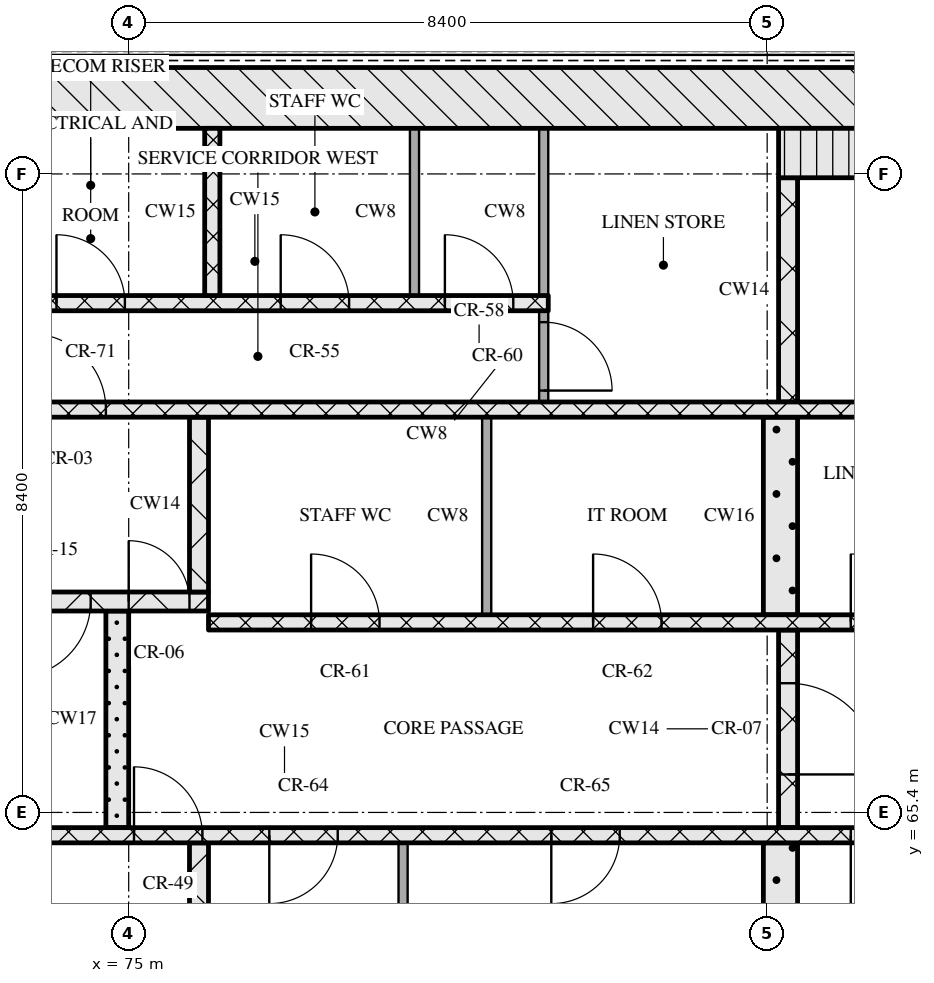
"""IFC4 building model, lengths in metres.
Left out: names, types, materials, properties, quantities, classifications, styles, units other than length and angle.
Written with IfcOpenShell. Run it as: python <this file> out.ifc"""

import sys

from ifc_helpers import new_model, si_unit, direction, frame, frame_2d, origin, place, context, subcontext, project, spatial, rectangle, extrude, element, fill, save


model = new_model("IFC4")
c1 = context("Model", 3, precision=1e-05, world=origin(), true_north=direction((0.0, 1.0)))
c2 = subcontext(c1, "Body", "Model", "MODEL_VIEW")
j1 = project(units=[si_unit("LENGTHUNIT", "METRE"), si_unit("PLANEANGLEUNIT", "RADIAN")], contexts=[c1])
p1 = place(None, origin())
s1 = spatial("IfcSite", under=j1, at=p1, CompositionType="ELEMENT")
p2 = place(p1, origin())
s2 = spatial("IfcBuilding", under=s1, at=p2, CompositionType="ELEMENT")
p3 = place(p2, frame((0.0, 0.0, 176.25)))
s3 = spatial("IfcBuildingStorey", under=s2, at=p3, CompositionType="ELEMENT", Elevation=176.25)
p4 = place(p3, frame((67.0, 74.8, 0.0), z_axis=(0.0, 0.0, 1.0), x_axis=(1.0, 0.0, 0.0)))
e1 = element("IfcWall", 1, at=p4, inside=s3, PredefinedType="SOLIDWALL", context=c2, shape_type="SweptSolid", body=[
    extrude(rectangle(XDim=41.2, YDim=0.8, at=frame_2d((20.6, 0.0))), origin(), (0.0, 0.0, 1.0), 3.32),
])
p5 = place(p3, frame((75.925, 62.4, 0.0), z_axis=(0.0, 0.0, 1.0), x_axis=(0.0, 1.0, 0.0)))
e2 = element("IfcWall", 2, at=p5, inside=s3, PredefinedType="SOLIDWALL", context=c2, shape_type="SweptSolid", body=[
    extrude(rectangle(XDim=2.6, YDim=0.25, at=frame_2d((1.3, 0.0))), origin(), (0.0, 0.0, 1.0), 3.32),
])
p6 = place(p3, frame((78.61, 62.4, 0.0), z_axis=(0.0, 0.0, 1.0), x_axis=(0.0, 1.0, 0.0)))
e3 = element("IfcWall", 3, at=p6, inside=s3, PredefinedType="PARTITIONING", context=c2, shape_type="SweptSolid", body=[
    extrude(rectangle(XDim=2.6, YDim=0.12, at=frame_2d((1.3, 0.0))), origin(), (0.0, 0.0, 1.0), 3.32),
])
p7 = place(p3, frame((83.575, 62.4, 0.0), z_axis=(0.0, 0.0, 1.0), x_axis=(0.0, 1.0, 0.0)))
e4 = element("IfcWall", 4, at=p7, inside=s3, PredefinedType="SOLIDWALL", context=c2, shape_type="SweptSolid", body=[
    extrude(rectangle(XDim=2.6, YDim=0.45, at=frame_2d((1.3, 0.0))), origin(), (0.0, 0.0, 1.0), 3.32),
])
p8 = place(p3, frame((67.8, 65.1, 0.0), z_axis=(0.0, 0.0, 1.0), x_axis=(1.0, 0.0, 0.0)))
e5 = element("IfcWall", 5, at=p8, inside=s3, PredefinedType="SOLIDWALL", context=c2, shape_type="SweptSolid", body=[
    extrude(rectangle(XDim=18.5, YDim=0.2, at=frame_2d((9.25, 0.0))), origin(), (0.0, 0.0, 1.0), 3.32),
])
p9 = place(p8, frame((7.27, 0.0, 0.0)))
e6 = element("IfcOpeningElement", 6, at=p9, cuts=e5, PredefinedType="OPENING", context=c2, shape_type="SweptSolid", body=[
    extrude(rectangle(XDim=0.9, YDim=2.1, at=frame_2d((0.45, 1.05))), frame((0.0, 0.11, 0.0), z_axis=(0.0, -1.0, 0.0), x_axis=(1.0, 0.0, 0.0)), (0.0, 0.0, 1.0), 0.22),
])
p10 = place(p8, frame((9.05, 0.0, 0.0)))
e7 = element("IfcOpeningElement", 7, at=p10, cuts=e5, PredefinedType="OPENING", context=c2, shape_type="SweptSolid", body=[
    extrude(rectangle(XDim=0.9, YDim=2.1, at=frame_2d((0.45, 1.05))), frame((0.0, 0.11, 0.0), z_axis=(0.0, -1.0, 0.0), x_axis=(1.0, 0.0, 0.0)), (0.0, 0.0, 1.0), 0.22),
])
p11 = place(p8, frame((12.76, 0.0, 0.0)))
e8 = element("IfcOpeningElement", 8, at=p11, cuts=e5, PredefinedType="OPENING", context=c2, shape_type="SweptSolid", body=[
    extrude(rectangle(XDim=0.9, YDim=2.1, at=frame_2d((0.45, 1.05))), frame((0.0, 0.11, 0.0), z_axis=(0.0, -1.0, 0.0), x_axis=(1.0, 0.0, 0.0)), (0.0, 0.0, 1.0), 0.22),
])
p12 = place(p8, frame((16.7, 0.0, 0.0)))
e9 = element("IfcOpeningElement", 9, at=p12, cuts=e5, PredefinedType="OPENING", context=c2, shape_type="SweptSolid", body=[
    extrude(rectangle(XDim=0.9, YDim=2.1, at=frame_2d((0.45, 1.05))), frame((0.0, 0.11, 0.0), z_axis=(0.0, -1.0, 0.0), x_axis=(1.0, 0.0, 0.0)), (0.0, 0.0, 1.0), 0.22),
])
p13 = place(p3, frame((74.85, 65.2, 0.0), z_axis=(0.0, 0.0, 1.0), x_axis=(0.0, 1.0, 0.0)))
e10 = element("IfcWall", 10, at=p13, inside=s3, PredefinedType="SOLIDWALL", context=c2, shape_type="SweptSolid", body=[
    extrude(rectangle(XDim=2.85, YDim=0.3, at=frame_2d((1.425, 0.0))), origin(), (0.0, 0.0, 1.0), 3.32),
])
p14 = place(p3, frame((83.675, 65.2, 0.0), z_axis=(0.0, 0.0, 1.0), x_axis=(0.0, 1.0, 0.0)))
e11 = element("IfcWall", 11, at=p14, inside=s3, PredefinedType="SOLIDWALL", context=c2, shape_type="SweptSolid", body=[
    extrude(rectangle(XDim=2.6, YDim=0.25, at=frame_2d((1.3, 0.0))), origin(), (0.0, 0.0, 1.0), 3.32),
])
p15 = place(p14, frame((0.7, 0.0, 0.0)))
e12 = element("IfcOpeningElement", 12, at=p15, cuts=e11, PredefinedType="OPENING", context=c2, shape_type="SweptSolid", body=[
    extrude(rectangle(XDim=1.2, YDim=2.1, at=frame_2d((0.6, 1.05))), frame((0.0, 0.135, 0.0), z_axis=(0.0, -1.0, 0.0), x_axis=(1.0, 0.0, 0.0)), (0.0, 0.0, 1.0), 0.27),
])
p16 = place(p3, frame((76.05, 67.9, 0.0), z_axis=(0.0, 0.0, 1.0), x_axis=(1.0, 0.0, 0.0)))
e13 = element("IfcWall", 13, at=p16, inside=s3, PredefinedType="SOLIDWALL", context=c2, shape_type="SweptSolid", body=[
    extrude(rectangle(XDim=23.1, YDim=0.2, at=frame_2d((11.55, 0.0))), origin(), (0.0, 0.0, 1.0), 3.32),
])
p17 = place(p16, frame((1.35, 0.0, 0.0)))
e14 = element("IfcOpeningElement", 14, at=p17, cuts=e13, PredefinedType="OPENING", context=c2, shape_type="SweptSolid", body=[
    extrude(rectangle(XDim=0.9, YDim=2.1, at=frame_2d((0.45, 1.05))), frame((0.0, 0.11, 0.0), z_axis=(0.0, -1.0, 0.0), x_axis=(1.0, 0.0, 0.0)), (0.0, 0.0, 1.0), 0.22),
])
p18 = place(p16, frame((5.06, 0.0, 0.0)))
e15 = element("IfcOpeningElement", 15, at=p18, cuts=e13, PredefinedType="OPENING", context=c2, shape_type="SweptSolid", body=[
    extrude(rectangle(XDim=0.9, YDim=2.1, at=frame_2d((0.45, 1.05))), frame((0.0, 0.11, 0.0), z_axis=(0.0, -1.0, 0.0), x_axis=(1.0, 0.0, 0.0)), (0.0, 0.0, 1.0), 0.22),
])
p19 = place(p16, frame((8.45, 0.0, 0.0)))
e16 = element("IfcOpeningElement", 16, at=p19, cuts=e13, PredefinedType="OPENING", context=c2, shape_type="SweptSolid", body=[
    extrude(rectangle(XDim=0.9, YDim=2.1, at=frame_2d((0.45, 1.05))), frame((0.0, 0.11, 0.0), z_axis=(0.0, -1.0, 0.0), x_axis=(1.0, 0.0, 0.0)), (0.0, 0.0, 1.0), 0.22),
])
p20 = place(p16, frame((10.91, 0.0, 0.0)))
e17 = element("IfcOpeningElement", 17, at=p20, cuts=e13, PredefinedType="OPENING", context=c2, shape_type="SweptSolid", body=[
    extrude(rectangle(XDim=0.9, YDim=2.1, at=frame_2d((0.45, 1.05))), frame((0.0, 0.11, 0.0), z_axis=(0.0, -1.0, 0.0), x_axis=(1.0, 0.0, 0.0)), (0.0, 0.0, 1.0), 0.22),
])
p21 = place(p16, frame((13.55, 0.0, 0.0)))
e18 = element("IfcOpeningElement", 18, at=p21, cuts=e13, PredefinedType="OPENING", context=c2, shape_type="SweptSolid", body=[
    extrude(rectangle(XDim=1.0, YDim=2.1, at=frame_2d((0.5, 1.05))), frame((0.0, 0.11, 0.0), z_axis=(0.0, -1.0, 0.0), x_axis=(1.0, 0.0, 0.0)), (0.0, 0.0, 1.0), 0.22),
])
p22 = place(p16, frame((16.2, 0.0, 0.0)))
e19 = element("IfcOpeningElement", 19, at=p22, cuts=e13, PredefinedType="OPENING", context=c2, shape_type="SweptSolid", body=[
    extrude(rectangle(XDim=1.1, YDim=2.1, at=frame_2d((0.55, 1.05))), frame((0.0, 0.11, 0.0), z_axis=(0.0, -1.0, 0.0), x_axis=(1.0, 0.0, 0.0)), (0.0, 0.0, 1.0), 0.22),
])
p23 = place(p16, frame((18.7, 0.0, 0.0)))
e20 = element("IfcOpeningElement", 20, at=p23, cuts=e13, PredefinedType="OPENING", context=c2, shape_type="SweptSolid", body=[
    extrude(rectangle(XDim=1.1, YDim=2.1, at=frame_2d((0.55, 1.05))), frame((0.0, 0.11, 0.0), z_axis=(0.0, -1.0, 0.0), x_axis=(1.0, 0.0, 0.0)), (0.0, 0.0, 1.0), 0.22),
])
p24 = place(p16, frame((21.2, 0.0, 0.0)))
e21 = element("IfcOpeningElement", 21, at=p24, cuts=e13, PredefinedType="OPENING", context=c2, shape_type="SweptSolid", body=[
    extrude(rectangle(XDim=1.1, YDim=2.1, at=frame_2d((0.55, 1.05))), frame((0.0, 0.11, 0.0), z_axis=(0.0, -1.0, 0.0), x_axis=(1.0, 0.0, 0.0)), (0.0, 0.0, 1.0), 0.22),
])
p25 = place(p3, frame((79.71, 68.0, 0.0), z_axis=(0.0, 0.0, 1.0), x_axis=(0.0, 1.0, 0.0)))
e22 = element("IfcWall", 22, at=p25, inside=s3, PredefinedType="PARTITIONING", context=c2, shape_type="SweptSolid", body=[
    extrude(rectangle(XDim=2.6, YDim=0.12, at=frame_2d((1.3, 0.0))), origin(), (0.0, 0.0, 1.0), 3.32),
])
p26 = place(p3, frame((83.575, 68.0, 0.0), z_axis=(0.0, 0.0, 1.0), x_axis=(0.0, 1.0, 0.0)))
e23 = element("IfcWall", 23, at=p26, inside=s3, PredefinedType="SOLIDWALL", context=c2, shape_type="SweptSolid", body=[
    extrude(rectangle(XDim=2.6, YDim=0.45, at=frame_2d((1.3, 0.0))), origin(), (0.0, 0.0, 1.0), 3.32),
])
p27 = place(p3, frame((67.8, 68.175, 0.0), z_axis=(0.0, 0.0, 1.0), x_axis=(1.0, 0.0, 0.0)))
e24 = element("IfcWall", 24, at=p27, inside=s3, PredefinedType="SOLIDWALL", context=c2, shape_type="SweptSolid", body=[
    extrude(rectangle(XDim=8.25, YDim=0.25, at=frame_2d((4.125, 0.0))), origin(), (0.0, 0.0, 1.0), 3.32),
])
p28 = place(p27, frame((5.7, 0.0, 0.0)))
e25 = element("IfcOpeningElement", 25, at=p28, cuts=e24, PredefinedType="OPENING", context=c2, shape_type="SweptSolid", body=[
    extrude(rectangle(XDim=1.0, YDim=2.1, at=frame_2d((0.5, 1.05))), frame((0.0, 0.135, 0.0), z_axis=(0.0, -1.0, 0.0), x_axis=(1.0, 0.0, 0.0)), (0.0, 0.0, 1.0), 0.27),
])
p29 = place(p27, frame((7.2, 0.0, 0.0)))
e26 = element("IfcOpeningElement", 26, at=p29, cuts=e24, PredefinedType="OPENING", context=c2, shape_type="SweptSolid", body=[
    extrude(rectangle(XDim=0.8, YDim=2.1, at=frame_2d((0.4, 1.05))), frame((0.0, 0.135, 0.0), z_axis=(0.0, -1.0, 0.0), x_axis=(1.0, 0.0, 0.0)), (0.0, 0.0, 1.0), 0.27),
])
p30 = place(p3, frame((75.925, 68.3, 0.0), z_axis=(0.0, 0.0, 1.0), x_axis=(0.0, 1.0, 0.0)))
e27 = element("IfcWall", 27, at=p30, inside=s3, PredefinedType="SOLIDWALL", context=c2, shape_type="SweptSolid", body=[
    extrude(rectangle(XDim=2.3, YDim=0.25, at=frame_2d((1.15, 0.0))), origin(), (0.0, 0.0, 1.0), 3.32),
])
p31 = place(p3, frame((67.8, 70.7, 0.0), z_axis=(0.0, 0.0, 1.0), x_axis=(1.0, 0.0, 0.0)))
e28 = element("IfcWall", 28, at=p31, inside=s3, PredefinedType="SOLIDWALL", context=c2, shape_type="SweptSolid", body=[
    extrude(rectangle(XDim=39.6, YDim=0.2, at=frame_2d((19.8, 0.0))), origin(), (0.0, 0.0, 1.0), 3.32),
])
p32 = place(p31, frame((0.65, 0.0, 0.0)))
e29 = element("IfcOpeningElement", 29, at=p32, cuts=e28, PredefinedType="OPENING", context=c2, shape_type="SweptSolid", body=[
    extrude(rectangle(XDim=1.1, YDim=2.1, at=frame_2d((0.55, 1.05))), frame((0.0, 0.11, 0.0), z_axis=(0.0, -1.0, 0.0), x_axis=(1.0, 0.0, 0.0)), (0.0, 0.0, 1.0), 0.22),
])
p33 = place(p31, frame((3.25, 0.0, 0.0)))
e30 = element("IfcOpeningElement", 30, at=p33, cuts=e28, PredefinedType="OPENING", context=c2, shape_type="SweptSolid", body=[
    extrude(rectangle(XDim=1.1, YDim=2.1, at=frame_2d((0.55, 1.05))), frame((0.0, 0.11, 0.0), z_axis=(0.0, -1.0, 0.0), x_axis=(1.0, 0.0, 0.0)), (0.0, 0.0, 1.0), 0.22),
])
p34 = place(p31, frame((5.9, 0.0, 0.0)))
e31 = element("IfcOpeningElement", 31, at=p34, cuts=e28, PredefinedType="OPENING", context=c2, shape_type="SweptSolid", body=[
    extrude(rectangle(XDim=1.0, YDim=2.1, at=frame_2d((0.5, 1.05))), frame((0.0, 0.11, 0.0), z_axis=(0.0, -1.0, 0.0), x_axis=(1.0, 0.0, 0.0)), (0.0, 0.0, 1.0), 0.22),
])
p35 = place(p31, frame((21.7, 0.0, 0.0)))
e32 = element("IfcOpeningElement", 32, at=p35, cuts=e28, PredefinedType="OPENING", context=c2, shape_type="SweptSolid", body=[
    extrude(rectangle(XDim=1.0, YDim=2.1, at=frame_2d((0.5, 1.05))), frame((0.0, 0.11, 0.0), z_axis=(0.0, -1.0, 0.0), x_axis=(1.0, 0.0, 0.0)), (0.0, 0.0, 1.0), 0.22),
])
p36 = place(p31, frame((32.7, 0.0, 0.0)))
e33 = element("IfcOpeningElement", 33, at=p36, cuts=e28, PredefinedType="OPENING", context=c2, shape_type="SweptSolid", body=[
    extrude(rectangle(XDim=1.0, YDim=2.1, at=frame_2d((0.5, 1.05))), frame((0.0, 0.11, 0.0), z_axis=(0.0, -1.0, 0.0), x_axis=(1.0, 0.0, 0.0)), (0.0, 0.0, 1.0), 0.22),
])
p37 = place(p31, frame((35.25, 0.0, 0.0)))
e34 = element("IfcOpeningElement", 34, at=p37, cuts=e28, PredefinedType="OPENING", context=c2, shape_type="SweptSolid", body=[
    extrude(rectangle(XDim=1.1, YDim=2.1, at=frame_2d((0.55, 1.05))), frame((0.0, 0.11, 0.0), z_axis=(0.0, -1.0, 0.0), x_axis=(1.0, 0.0, 0.0)), (0.0, 0.0, 1.0), 0.22),
])
p38 = place(p31, frame((37.85, 0.0, 0.0)))
e35 = element("IfcOpeningElement", 35, at=p38, cuts=e28, PredefinedType="OPENING", context=c2, shape_type="SweptSolid", body=[
    extrude(rectangle(XDim=1.1, YDim=2.1, at=frame_2d((0.55, 1.05))), frame((0.0, 0.11, 0.0), z_axis=(0.0, -1.0, 0.0), x_axis=(1.0, 0.0, 0.0)), (0.0, 0.0, 1.0), 0.22),
])
p39 = place(p3, frame((80.46, 70.8, 0.0), z_axis=(0.0, 0.0, 1.0), x_axis=(0.0, 1.0, 0.0)))
e36 = element("IfcWall", 36, at=p39, inside=s3, PredefinedType="PARTITIONING", context=c2, shape_type="SweptSolid", body=[
    extrude(rectangle(XDim=1.2, YDim=0.12, at=frame_2d((0.6, 0.0))), origin(), (0.0, 0.0, 1.0), 3.32),
])
p40 = place(p39, frame((0.15, 0.0, 0.0)))
e37 = element("IfcOpeningElement", 37, at=p40, cuts=e36, PredefinedType="OPENING", context=c2, shape_type="SweptSolid", body=[
    extrude(rectangle(XDim=0.9, YDim=2.1, at=frame_2d((0.45, 1.05))), frame((0.0, 0.07, 0.0), z_axis=(0.0, -1.0, 0.0), x_axis=(1.0, 0.0, 0.0)), (0.0, 0.0, 1.0), 0.14),
])
p41 = place(p3, frame((83.675, 70.8, 0.0), z_axis=(0.0, 0.0, 1.0), x_axis=(0.0, 1.0, 0.0)))
e38 = element("IfcWall", 38, at=p41, inside=s3, PredefinedType="SOLIDWALL", context=c2, shape_type="SweptSolid", body=[
    extrude(rectangle(XDim=2.95, YDim=0.25, at=frame_2d((1.475, 0.0))), origin(), (0.0, 0.0, 1.0), 3.32),
])
p42 = place(p3, frame((72.8, 72.1, 0.0), z_axis=(0.0, 0.0, 1.0), x_axis=(1.0, 0.0, 0.0)))
e39 = element("IfcWall", 39, at=p42, inside=s3, PredefinedType="SOLIDWALL", context=c2, shape_type="SweptSolid", body=[
    extrude(rectangle(XDim=7.72, YDim=0.2, at=frame_2d((3.86, 0.0))), origin(), (0.0, 0.0, 1.0), 3.32),
])
p43 = place(p42, frame((1.25, 0.0, 0.0)))
e40 = element("IfcOpeningElement", 40, at=p43, cuts=e39, PredefinedType="OPENING", context=c2, shape_type="SweptSolid", body=[
    extrude(rectangle(XDim=0.9, YDim=2.1, at=frame_2d((0.45, 1.05))), frame((0.0, 0.11, 0.0), z_axis=(0.0, -1.0, 0.0), x_axis=(1.0, 0.0, 0.0)), (0.0, 0.0, 1.0), 0.22),
])
p44 = place(p42, frame((4.2, 0.0, 0.0)))
e41 = element("IfcOpeningElement", 41, at=p44, cuts=e39, PredefinedType="OPENING", context=c2, shape_type="SweptSolid", body=[
    extrude(rectangle(XDim=0.9, YDim=2.1, at=frame_2d((0.45, 1.05))), frame((0.0, 0.11, 0.0), z_axis=(0.0, -1.0, 0.0), x_axis=(1.0, 0.0, 0.0)), (0.0, 0.0, 1.0), 0.22),
])
p45 = place(p42, frame((6.36, 0.0, 0.0)))
e42 = element("IfcOpeningElement", 42, at=p45, cuts=e39, PredefinedType="OPENING", context=c2, shape_type="SweptSolid", body=[
    extrude(rectangle(XDim=0.9, YDim=2.1, at=frame_2d((0.45, 1.05))), frame((0.0, 0.11, 0.0), z_axis=(0.0, -1.0, 0.0), x_axis=(1.0, 0.0, 0.0)), (0.0, 0.0, 1.0), 0.22),
])
p46 = place(p3, frame((76.1, 72.2, 0.0), z_axis=(0.0, 0.0, 1.0), x_axis=(0.0, 1.0, 0.0)))
e43 = element("IfcWall", 43, at=p46, inside=s3, PredefinedType="SOLIDWALL", context=c2, shape_type="SweptSolid", body=[
    extrude(rectangle(XDim=2.2, YDim=0.2, at=frame_2d((1.1, 0.0))), origin(), (0.0, 0.0, 1.0), 3.32),
])
for number, where, z_axis, x_axis in (
    (44, (78.76, 72.2, 0.0), (0.0, 0.0, 1.0), (0.0, 1.0, 0.0)),
    (45, (80.46, 72.2, 0.0), (0.0, 0.0, 1.0), (0.0, 1.0, 0.0)),
):
    element("IfcWall", number, at=place(p3, frame(where, z_axis=z_axis, x_axis=x_axis)), inside=s3, PredefinedType="PARTITIONING", context=c2, shape_type="SweptSolid", body=[
        extrude(rectangle(XDim=2.2, YDim=0.12, at=frame_2d((1.1, 0.0))), origin(), (0.0, 0.0, 1.0), 3.32),
    ])
p47 = place(p3, frame((83.55, 74.075, 0.0), z_axis=(0.0, 0.0, 1.0), x_axis=(1.0, 0.0, 0.0)))
e46 = element("IfcWall", 46, at=p47, inside=s3, PredefinedType="SOLIDWALL", context=c2, shape_type="SweptSolid", body=[
    extrude(rectangle(XDim=8.1, YDim=0.65, at=frame_2d((4.05, 0.0))), origin(), (0.0, 0.0, 1.0), 3.32),
])
p48 = place(p9, origin())
e47 = element("IfcDoor", 47, at=p48, inside=s3, OperationType="SINGLE_SWING_LEFT", PredefinedType="DOOR", context=c2, shape_type="SweptSolid", body=[
    extrude(rectangle(XDim=0.9, YDim=2.1, at=frame_2d((0.45, 1.05))), frame((0.0, 0.025, 0.0), z_axis=(0.0, -1.0, 0.0), x_axis=(1.0, 0.0, 0.0)), (0.0, 0.0, 1.0), 0.05),
])
fill(e6, e47)
p49 = place(p10, origin())
e48 = element("IfcDoor", 48, at=p49, inside=s3, OperationType="SINGLE_SWING_RIGHT", PredefinedType="DOOR", context=c2, shape_type="SweptSolid", body=[
    extrude(rectangle(XDim=0.9, YDim=2.1, at=frame_2d((0.45, 1.05))), frame((0.0, 0.025, 0.0), z_axis=(0.0, -1.0, 0.0), x_axis=(1.0, 0.0, 0.0)), (0.0, 0.0, 1.0), 0.05),
])
fill(e7, e48)
p50 = place(p11, origin())
e49 = element("IfcDoor", 49, at=p50, inside=s3, OperationType="SINGLE_SWING_RIGHT", PredefinedType="DOOR", context=c2, shape_type="SweptSolid", body=[
    extrude(rectangle(XDim=0.9, YDim=2.1, at=frame_2d((0.45, 1.05))), frame((0.0, 0.025, 0.0), z_axis=(0.0, -1.0, 0.0), x_axis=(1.0, 0.0, 0.0)), (0.0, 0.0, 1.0), 0.05),
])
fill(e8, e49)
p51 = place(p12, origin())
e50 = element("IfcDoor", 50, at=p51, inside=s3, OperationType="SINGLE_SWING_RIGHT", PredefinedType="DOOR", context=c2, shape_type="SweptSolid", body=[
    extrude(rectangle(XDim=0.9, YDim=2.1, at=frame_2d((0.45, 1.05))), frame((0.0, 0.025, 0.0), z_axis=(0.0, -1.0, 0.0), x_axis=(1.0, 0.0, 0.0)), (0.0, 0.0, 1.0), 0.05),
])
fill(e9, e50)
p52 = place(p15, origin())
e51 = element("IfcDoor", 51, at=p52, inside=s3, OperationType="SINGLE_SWING_RIGHT", PredefinedType="DOOR", context=c2, shape_type="SweptSolid", body=[
    extrude(rectangle(XDim=1.2, YDim=2.1, at=frame_2d((0.6, 1.05))), frame((0.0, 0.025, 0.0), z_axis=(0.0, -1.0, 0.0), x_axis=(1.0, 0.0, 0.0)), (0.0, 0.0, 1.0), 0.05),
])
fill(e12, e51)
p53 = place(p17, origin())
e52 = element("IfcDoor", 52, at=p53, inside=s3, OperationType="SINGLE_SWING_LEFT", PredefinedType="DOOR", context=c2, shape_type="SweptSolid", body=[
    extrude(rectangle(XDim=0.9, YDim=2.1, at=frame_2d((0.45, 1.05))), frame((0.0, 0.025, 0.0), z_axis=(0.0, -1.0, 0.0), x_axis=(1.0, 0.0, 0.0)), (0.0, 0.0, 1.0), 0.05),
])
fill(e14, e52)
p54 = place(p18, origin())
e53 = element("IfcDoor", 53, at=p54, inside=s3, OperationType="SINGLE_SWING_LEFT", PredefinedType="DOOR", context=c2, shape_type="SweptSolid", body=[
    extrude(rectangle(XDim=0.9, YDim=2.1, at=frame_2d((0.45, 1.05))), frame((0.0, 0.025, 0.0), z_axis=(0.0, -1.0, 0.0), x_axis=(1.0, 0.0, 0.0)), (0.0, 0.0, 1.0), 0.05),
])
fill(e15, e53)
p55 = place(p19, origin())
e54 = element("IfcDoor", 54, at=p55, inside=s3, OperationType="SINGLE_SWING_LEFT", PredefinedType="DOOR", context=c2, shape_type="SweptSolid", body=[
    extrude(rectangle(XDim=0.9, YDim=2.1, at=frame_2d((0.45, 1.05))), frame((0.0, 0.025, 0.0), z_axis=(0.0, -1.0, 0.0), x_axis=(1.0, 0.0, 0.0)), (0.0, 0.0, 1.0), 0.05),
])
fill(e16, e54)
p56 = place(p28, origin())
e55 = element("IfcDoor", 55, at=p56, inside=s3, OperationType="SINGLE_SWING_RIGHT", PredefinedType="DOOR", context=c2, shape_type="SweptSolid", body=[
    extrude(rectangle(XDim=1.0, YDim=2.1, at=frame_2d((0.5, 1.05))), frame((0.0, 0.025, 0.0), z_axis=(0.0, -1.0, 0.0), x_axis=(1.0, 0.0, 0.0)), (0.0, 0.0, 1.0), 0.05),
])
fill(e25, e55)
p57 = place(p29, origin())
e56 = element("IfcDoor", 56, at=p57, inside=s3, OperationType="SINGLE_SWING_LEFT", PredefinedType="DOOR", context=c2, shape_type="SweptSolid", body=[
    extrude(rectangle(XDim=0.8, YDim=2.1, at=frame_2d((0.4, 1.05))), frame((0.0, 0.025, 0.0), z_axis=(0.0, -1.0, 0.0), x_axis=(1.0, 0.0, 0.0)), (0.0, 0.0, 1.0), 0.05),
])
fill(e26, e56)
p58 = place(p34, origin())
e57 = element("IfcDoor", 57, at=p58, inside=s3, OperationType="SINGLE_SWING_LEFT", PredefinedType="DOOR", context=c2, shape_type="SweptSolid", body=[
    extrude(rectangle(XDim=1.0, YDim=2.1, at=frame_2d((0.5, 1.05))), frame((0.0, 0.025, 0.0), z_axis=(0.0, -1.0, 0.0), x_axis=(1.0, 0.0, 0.0)), (0.0, 0.0, 1.0), 0.05),
])
fill(e31, e57)
p59 = place(p40, origin())
e58 = element("IfcDoor", 58, at=p59, inside=s3, OperationType="SINGLE_SWING_RIGHT", PredefinedType="DOOR", context=c2, shape_type="SweptSolid", body=[
    extrude(rectangle(XDim=0.9, YDim=2.1, at=frame_2d((0.45, 1.05))), frame((0.0, 0.025, 0.0), z_axis=(0.0, -1.0, 0.0), x_axis=(1.0, 0.0, 0.0)), (0.0, 0.0, 1.0), 0.05),
])
fill(e37, e58)
p60 = place(p43, origin())
e59 = element("IfcDoor", 59, at=p60, inside=s3, OperationType="SINGLE_SWING_LEFT", PredefinedType="DOOR", context=c2, shape_type="SweptSolid", body=[
    extrude(rectangle(XDim=0.9, YDim=2.1, at=frame_2d((0.45, 1.05))), frame((0.0, 0.025, 0.0), z_axis=(0.0, -1.0, 0.0), x_axis=(1.0, 0.0, 0.0)), (0.0, 0.0, 1.0), 0.05),
])
fill(e40, e59)
p61 = place(p44, origin())
e60 = element("IfcDoor", 60, at=p61, inside=s3, OperationType="SINGLE_SWING_LEFT", PredefinedType="DOOR", context=c2, shape_type="SweptSolid", body=[
    extrude(rectangle(XDim=0.9, YDim=2.1, at=frame_2d((0.45, 1.05))), frame((0.0, 0.025, 0.0), z_axis=(0.0, -1.0, 0.0), x_axis=(1.0, 0.0, 0.0)), (0.0, 0.0, 1.0), 0.05),
])
fill(e41, e60)
p62 = place(p45, origin())
e61 = element("IfcDoor", 61, at=p62, inside=s3, OperationType="SINGLE_SWING_LEFT", PredefinedType="DOOR", context=c2, shape_type="SweptSolid", body=[
    extrude(rectangle(XDim=0.9, YDim=2.1, at=frame_2d((0.45, 1.05))), frame((0.0, 0.025, 0.0), z_axis=(0.0, -1.0, 0.0), x_axis=(1.0, 0.0, 0.0)), (0.0, 0.0, 1.0), 0.05),
])
fill(e42, e61)
save(model, sys.argv[1])
